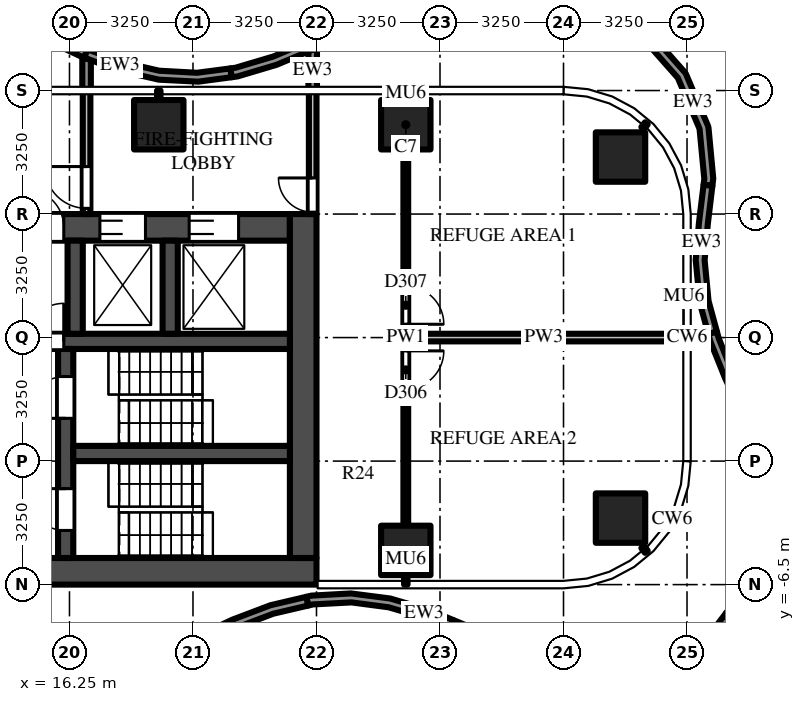
"""IFC4 building model, lengths in metres.
Left out: names, types, materials, properties, quantities, classifications, styles, units other than length and angle.
Written with IfcOpenShell. Run it as: python <this file> out.ifc"""

import sys

from ifc_helpers import new_model, si_unit, direction, frame, frame_2d, origin, origin_2d, place, context, subcontext, project, spatial, polyline, rectangle, outline, extrude, source, transform, mapped, element, fill, save


model = new_model("IFC4")
c1 = context("Model", 3, precision=1e-05, world=origin(), true_north=direction((0.0, 1.0)))
c2 = subcontext(c1, "Body", "Model", "MODEL_VIEW")
j1 = project(units=[si_unit("LENGTHUNIT", "METRE"), si_unit("PLANEANGLEUNIT", "RADIAN")], contexts=[c1])
p1 = place(None, origin())
s1 = spatial("IfcSite", under=j1, at=p1, CompositionType="ELEMENT")
p2 = place(p1, origin())
s2 = spatial("IfcBuilding", under=s1, at=p2, CompositionType="ELEMENT")
p3 = place(p2, frame((0.0, 0.0, 92.5)))
s3 = spatial("IfcBuildingStorey", under=s2, at=p3, CompositionType="ELEMENT", Elevation=92.5)
m1 = source(origin(), c2, "Body", "SweptSolid", [
    extrude(rectangle(XDim=1.3, YDim=1.3, at=origin_2d()), origin(), (0.0, 0.0, 1.0), 5.0),
])
for number, where, z_axis, x_axis in (
    (1, (18.6, 5.6, 0.0), (0.0, 0.0, 1.0), (1.0, 0.0, 0.0)),
    (2, (25.1, 5.6, 0.0), (0.0, 0.0, 1.0), (1.0, 0.0, 0.0)),
    (3, (30.75, 4.75, 0.0), (0.0, 0.0, 1.0), (1.0, 0.0, 0.0)),
    (4, (25.1, -5.6, 0.0), (0.0, 0.0, 1.0), (1.0, 0.0, 0.0)),
    (5, (30.75, -4.75, 0.0), (0.0, 0.0, 1.0), (1.0, 0.0, 0.0)),
):
    element("IfcColumn", number, at=place(p3, frame(where, z_axis=z_axis, x_axis=x_axis)), inside=s3, PredefinedType="COLUMN", context=c2, shape_type="MappedRepresentation", body=[
        mapped(m1, transform((0.0, 0.0, 0.0))),
    ])
m2 = source(origin(), c2, "Body", "SweptSolid", [
    extrude(rectangle(XDim=16.5, YDim=0.7, at=frame_2d((8.25, 0.0))), origin(), (0.0, 0.0, 1.0), 4.75),
])
p4 = place(p3, frame((6.25, -6.15, 0.0), z_axis=(0.0, 0.0, 1.0), x_axis=(1.0, 0.0, 0.0)))
e6 = element("IfcWall", 6, at=p4, inside=s3, PredefinedType="SHEAR", context=c2, shape_type="MappedRepresentation", body=[
    mapped(m2, transform((0.0, 0.0, 0.0))),
])
m3 = source(origin(), c2, "Body", "SweptSolid", [
    extrude(rectangle(XDim=14.85, YDim=0.7, at=frame_2d((7.425, 0.0))), origin(), (0.0, 0.0, 1.0), 4.75),
])
p5 = place(p3, frame((7.2, 2.9, 0.0), z_axis=(0.0, 0.0, 1.0), x_axis=(1.0, 0.0, 0.0)))
e7 = element("IfcWall", 7, at=p5, inside=s3, PredefinedType="SHEAR", context=c2, shape_type="MappedRepresentation", body=[
    mapped(m3, transform((0.0, 0.0, 0.0))),
])
m4 = source(origin(), c2, "Body", "SweptSolid", [
    extrude(rectangle(XDim=1.3, YDim=2.1, at=frame_2d((0.65, 1.05))), frame((0.0, 0.36, 0.0), z_axis=(0.0, -1.0, 0.0), x_axis=(1.0, 0.0, 0.0)), (0.0, 0.0, 1.0), 0.72),
])
p6 = place(p5, frame((12.2, 0.0, 0.0)))
e8 = element("IfcOpeningElement", 8, at=p6, cuts=e7, PredefinedType="OPENING", context=c2, shape_type="MappedRepresentation", body=[
    mapped(m4, transform((0.0, 0.0, 0.0))),
])
m5 = source(origin(), c2, "Body", "SweptSolid", [
    extrude(rectangle(XDim=1.2, YDim=2.1, at=frame_2d((0.6, 1.05))), frame((0.0, 0.36, 0.0), z_axis=(0.0, -1.0, 0.0), x_axis=(1.0, 0.0, 0.0)), (0.0, 0.0, 1.0), 0.72),
])
p7 = place(p5, frame((9.85, 0.0, 0.0)))
e9 = element("IfcOpeningElement", 9, at=p7, cuts=e7, PredefinedType="OPENING", context=c2, shape_type="MappedRepresentation", body=[
    mapped(m5, transform((0.0, 0.0, 0.0))),
])
m6 = source(origin(), c2, "Body", "SweptSolid", [
    extrude(rectangle(XDim=1.0, YDim=2.1, at=frame_2d((0.5, 1.05))), frame((0.0, 0.36, 0.0), z_axis=(0.0, -1.0, 0.0), x_axis=(1.0, 0.0, 0.0)), (0.0, 0.0, 1.0), 0.72),
])
p8 = place(p5, frame((7.9, 0.0, 0.0)))
e10 = element("IfcOpeningElement", 10, at=p8, cuts=e7, PredefinedType="OPENING", context=c2, shape_type="MappedRepresentation", body=[
    mapped(m6, transform((0.0, 0.0, 0.0))),
])
m7 = source(origin(), c2, "Body", "SweptSolid", [
    extrude(rectangle(XDim=0.8, YDim=2.1, at=frame_2d((0.4, 1.05))), frame((0.0, 0.36, 0.0), z_axis=(0.0, -1.0, 0.0), x_axis=(1.0, 0.0, 0.0)), (0.0, 0.0, 1.0), 0.72),
])
p9 = place(p5, frame((0.113, 0.0, 0.0)))
e11 = element("IfcOpeningElement", 11, at=p9, cuts=e7, PredefinedType="OPENING", context=c2, shape_type="MappedRepresentation", body=[
    mapped(m7, transform((0.0, 0.0, 0.0))),
])
p10 = place(p5, frame((1.288, 0.0, 0.0)))
e12 = element("IfcOpeningElement", 12, at=p10, cuts=e7, PredefinedType="OPENING", context=c2, shape_type="MappedRepresentation", body=[
    mapped(m7, transform((0.0, 0.0, 0.0))),
])
p11 = place(p5, frame((2.712, 0.0, 0.0)))
e13 = element("IfcOpeningElement", 13, at=p11, cuts=e7, PredefinedType="OPENING", context=c2, shape_type="MappedRepresentation", body=[
    mapped(m7, transform((0.0, 0.0, 0.0))),
])
p12 = place(p5, frame((3.887, 0.0, 0.0)))
e14 = element("IfcOpeningElement", 14, at=p12, cuts=e7, PredefinedType="OPENING", context=c2, shape_type="MappedRepresentation", body=[
    mapped(m7, transform((0.0, 0.0, 0.0))),
])
p13 = place(p5, frame((5.312, 0.0, 0.0)))
e15 = element("IfcOpeningElement", 15, at=p13, cuts=e7, PredefinedType="OPENING", context=c2, shape_type="MappedRepresentation", body=[
    mapped(m7, transform((0.0, 0.0, 0.0))),
])
p14 = place(p5, frame((6.488, 0.0, 0.0)))
e16 = element("IfcOpeningElement", 16, at=p14, cuts=e7, PredefinedType="OPENING", context=c2, shape_type="MappedRepresentation", body=[
    mapped(m7, transform((0.0, 0.0, 0.0))),
])
m8 = source(origin(), c2, "Body", "SweptSolid", [
    extrude(rectangle(XDim=9.05, YDim=0.7, at=frame_2d((4.525, 0.0))), origin(), (0.0, 0.0, 1.0), 4.75),
])
p15 = place(p3, frame((22.4, -5.8, 0.0), z_axis=(0.0, 0.0, 1.0), x_axis=(0.0, 1.0, 0.0)))
e17 = element("IfcWall", 17, at=p15, inside=s3, PredefinedType="SHEAR", context=c2, shape_type="MappedRepresentation", body=[
    mapped(m8, transform((0.0, 0.0, 0.0))),
])
m9 = source(origin(), c2, "Body", "SweptSolid", [
    extrude(rectangle(XDim=14.85, YDim=0.4, at=frame_2d((7.425, 0.0))), origin(), (0.0, 0.0, 1.0), 4.75),
])
p16 = place(p3, frame((7.2, -0.1, 0.0), z_axis=(0.0, 0.0, 1.0), x_axis=(1.0, 0.0, 0.0)))
e18 = element("IfcWall", 18, at=p16, inside=s3, PredefinedType="SHEAR", context=c2, shape_type="MappedRepresentation", body=[
    mapped(m9, transform((0.0, 0.0, 0.0))),
])
m10 = source(origin(), c2, "Body", "SweptSolid", [
    extrude(rectangle(XDim=1.0, YDim=2.1, at=frame_2d((0.5, 1.05))), frame((0.0, 0.21, 0.0), z_axis=(0.0, -1.0, 0.0), x_axis=(1.0, 0.0, 0.0)), (0.0, 0.0, 1.0), 0.42),
])
p17 = place(p16, frame((7.9, 0.0, 0.0)))
e19 = element("IfcOpeningElement", 19, at=p17, cuts=e18, PredefinedType="OPENING", context=c2, shape_type="MappedRepresentation", body=[
    mapped(m10, transform((0.0, 0.0, 0.0))),
])
m11 = source(origin(), c2, "Body", "SweptSolid", [
    extrude(rectangle(XDim=5.5, YDim=0.4, at=frame_2d((2.75, 0.0))), origin(), (0.0, 0.0, 1.0), 4.75),
])
p18 = place(p3, frame((16.15, -5.8, 0.0), z_axis=(0.0, 0.0, 1.0), x_axis=(0.0, 1.0, 0.0)))
e20 = element("IfcWall", 20, at=p18, inside=s3, PredefinedType="SHEAR", context=c2, shape_type="MappedRepresentation", body=[
    mapped(m11, transform((0.0, 0.0, 0.0))),
])
m12 = source(origin(), c2, "Body", "SweptSolid", [
    extrude(rectangle(XDim=1.1, YDim=2.1, at=frame_2d((0.55, 1.05))), frame((0.0, 0.21, 0.0), z_axis=(0.0, -1.0, 0.0), x_axis=(1.0, 0.0, 0.0)), (0.0, 0.0, 1.0), 0.42),
])
p19 = place(p18, frame((0.725, 0.0, 0.0)))
e21 = element("IfcOpeningElement", 21, at=p19, cuts=e20, PredefinedType="OPENING", context=c2, shape_type="MappedRepresentation", body=[
    mapped(m12, transform((0.0, 0.0, 0.0))),
])
p20 = place(p18, frame((3.675, 0.0, 0.0)))
e22 = element("IfcOpeningElement", 22, at=p20, cuts=e20, PredefinedType="OPENING", context=c2, shape_type="MappedRepresentation", body=[
    mapped(m12, transform((0.0, 0.0, 0.0))),
])
m13 = source(origin(), c2, "Body", "SweptSolid", [
    extrude(rectangle(XDim=5.7, YDim=0.4, at=frame_2d((2.85, 0.0))), origin(), (0.0, 0.0, 1.0), 4.75),
])
p21 = place(p3, frame((16.35, -3.05, 0.0), z_axis=(0.0, 0.0, 1.0), x_axis=(1.0, 0.0, 0.0)))
e23 = element("IfcWall", 23, at=p21, inside=s3, PredefinedType="SHEAR", context=c2, shape_type="MappedRepresentation", body=[
    mapped(m13, transform((0.0, 0.0, 0.0))),
])
m14 = source(origin(), c2, "Body", "SweptSolid", [
    extrude(rectangle(XDim=2.45, YDim=0.4, at=frame_2d((1.225, 0.0))), origin(), (0.0, 0.0, 1.0), 4.75),
])
for number, where, z_axis, x_axis in (
    (24, (16.4, 0.1, 0.0), (0.0, 0.0, 1.0), (0.0, 1.0, 0.0)),
    (25, (18.9, 0.1, 0.0), (0.0, 0.0, 1.0), (0.0, 1.0, 0.0)),
):
    element("IfcWall", number, at=place(p3, frame(where, z_axis=z_axis, x_axis=x_axis)), inside=s3, PredefinedType="SHEAR", context=c2, shape_type="MappedRepresentation", body=[
        mapped(m14, transform((0.0, 0.0, 0.0))),
    ])
m15 = source(origin(), c2, "Body", "SweptSolid", [
    extrude(rectangle(XDim=3.25, YDim=0.2, at=frame_2d((1.625, 0.0))), origin(), (0.0, 0.0, 1.0), 4.75),
])
p22 = place(p3, frame((16.7, 3.25, 0.0), z_axis=(0.0, 0.0, 1.0), x_axis=(0.0, 1.0, 0.0)))
e26 = element("IfcWall", 26, at=p22, inside=s3, PredefinedType="PARTITIONING", context=c2, shape_type="MappedRepresentation", body=[
    mapped(m15, transform((0.0, 0.0, 0.0))),
])
m16 = source(origin(), c2, "Body", "SweptSolid", [
    extrude(rectangle(XDim=1.1, YDim=2.1, at=frame_2d((0.55, 1.05))), frame((0.0, 0.11, 0.0), z_axis=(0.0, -1.0, 0.0), x_axis=(1.0, 0.0, 0.0)), (0.0, 0.0, 1.0), 0.22),
])
p23 = place(p22, frame((0.15, 0.0, 0.0)))
e27 = element("IfcOpeningElement", 27, at=p23, cuts=e26, PredefinedType="OPENING", context=c2, shape_type="MappedRepresentation", body=[
    mapped(m16, transform((0.0, 0.0, 0.0))),
])
p24 = place(p3, frame((22.65, 3.25, 0.0), z_axis=(0.0, 0.0, 1.0), x_axis=(0.0, 1.0, 0.0)))
e28 = element("IfcWall", 28, at=p24, inside=s3, PredefinedType="PARTITIONING", context=c2, shape_type="MappedRepresentation", body=[
    mapped(m15, transform((0.0, 0.0, 0.0))),
])
m17 = source(origin(), c2, "Body", "SweptSolid", [
    extrude(rectangle(XDim=0.9, YDim=2.1, at=frame_2d((0.45, 1.05))), frame((0.0, 0.11, 0.0), z_axis=(0.0, -1.0, 0.0), x_axis=(1.0, 0.0, 0.0)), (0.0, 0.0, 1.0), 0.22),
])
p25 = place(p24, frame((0.05, 0.0, 0.0)))
e29 = element("IfcOpeningElement", 29, at=p25, cuts=e28, PredefinedType="OPENING", context=c2, shape_type="MappedRepresentation", body=[
    mapped(m17, transform((0.0, 0.0, 0.0))),
])
p26 = place(p3, frame((22.65, 6.5, 0.0), z_axis=(0.0, 0.0, 1.0), x_axis=(0.0, 1.0, 0.0)))
e30 = element("IfcWall", 30, at=p26, inside=s3, PredefinedType="PARAPET", context=c2, shape_type="SweptSolid", body=[
    extrude(rectangle(XDim=1.076, YDim=0.225, at=frame_2d((0.538, 0.0))), origin(), (0.0, 0.0, 1.0), 1.1),
])
p27 = place(p3, frame((16.7, 6.5, 0.0), z_axis=(0.0, 0.0, 1.0), x_axis=(0.0, 1.0, 0.0)))
e31 = element("IfcWall", 31, at=p27, inside=s3, PredefinedType="PARAPET", context=c2, shape_type="SweptSolid", body=[
    extrude(rectangle(XDim=0.842, YDim=0.225, at=frame_2d((0.421, 0.0))), origin(), (0.0, 0.0, 1.0), 1.1),
])
p28 = place(p3, origin())
e32 = element("IfcWall", 32, at=p28, inside=s3, PredefinedType="PARAPET", context=c2, shape_type="SweptSolid", body=[
    extrude(outline(polyline([(13.069, 9.166), (13.649, 8.982), (14.668, 8.544), (16.642, 7.615), (16.722, 7.585), (16.64, 7.365), (16.546, 7.4), (14.57, 8.33), (13.573, 8.759), (12.998, 8.942), (13.069, 9.166)])), origin(), (0.0, 0.0, 1.0), 1.1),
])
e33 = element("IfcWall", 33, at=p28, inside=s3, PredefinedType="PARAPET", context=c2, shape_type="SweptSolid", body=[
    extrude(outline(polyline([(16.722, 7.585), (17.626, 7.249), (18.612, 7.022), (19.605, 6.967), (20.486, 7.083), (20.517, 6.851), (19.637, 6.733), (18.602, 6.786), (17.552, 7.026), (16.64, 7.365), (16.722, 7.585)])), origin(), (0.0, 0.0, 1.0), 1.1),
])
e34 = element("IfcWall", 34, at=p28, inside=s3, PredefinedType="PARAPET", context=c2, shape_type="SweptSolid", body=[
    extrude(outline(polyline([(20.486, 7.083), (20.617, 7.1), (21.613, 7.396), (22.64, 7.826), (24.102, 8.516), (24.202, 8.304), (22.738, 7.613), (21.705, 7.179), (20.675, 6.872), (20.517, 6.851), (20.486, 7.083)])), origin(), (0.0, 0.0, 1.0), 1.1),
])
e35 = element("IfcWall", 35, at=p28, inside=s3, PredefinedType="PARAPET", context=c2, shape_type="SweptSolid", body=[
    extrude(outline(polyline([(31.748, 7.767), (32.447, 6.974), (32.474, 6.932), (33.053, 5.568), (33.065, 5.522), (33.19, 4.186), (33.167, 3.992), (32.936, 4.021), (32.955, 4.177), (32.83, 5.493), (32.259, 6.833), (31.571, 7.61), (31.748, 7.767)])), origin(), (0.0, 0.0, 1.0), 1.1),
])
e36 = element("IfcWall", 36, at=p28, inside=s3, PredefinedType="PARAPET", context=c2, shape_type="SweptSolid", body=[
    extrude(outline(polyline([(33.167, 3.992), (33.049, 3.003), (32.963, 2.033), (33.067, 0.965), (33.287, 0.155), (33.061, 0.093), (32.837, 0.913), (32.729, 2.043), (32.815, 3.029), (32.936, 4.021), (33.167, 3.992)])), origin(), (0.0, 0.0, 1.0), 1.1),
])
e37 = element("IfcWall", 37, at=p28, inside=s3, PredefinedType="PARAPET", context=c2, shape_type="SweptSolid", body=[
    extrude(outline(polyline([(33.287, 0.155), (33.335, -0.02), (33.72, -0.981), (34.651, -2.967), (34.663, -3.007), (34.753, -3.545), (34.521, -3.584), (34.431, -3.052), (33.503, -1.072), (33.114, -0.101), (33.061, 0.093), (33.287, 0.155)])), origin(), (0.0, 0.0, 1.0), 1.1),
])
e38 = element("IfcWall", 38, at=p28, inside=s3, PredefinedType="PARAPET", context=c2, shape_type="SweptSolid", body=[
    extrude(outline(polyline([(33.713, -7.389), (33.325, -7.9), (33.269, -7.945), (31.684, -8.843), (31.616, -8.862), (30.069, -9.046), (30.042, -8.808), (31.576, -8.63), (31.606, -8.62), (33.161, -7.731), (33.528, -7.248), (33.713, -7.389)])), origin(), (0.0, 0.0, 1.0), 1.1),
])
e39 = element("IfcWall", 39, at=p28, inside=s3, PredefinedType="PARAPET", context=c2, shape_type="SweptSolid", body=[
    extrude(outline(polyline([(30.069, -9.046), (29.998, -9.055), (29.908, -9.049), (28.583, -8.727), (26.629, -7.802), (26.254, -7.647), (26.344, -7.43), (26.727, -7.588), (28.673, -8.509), (29.953, -8.818), (30.042, -8.808), (30.069, -9.046)])), origin(), (0.0, 0.0, 1.0), 1.1),
])
e40 = element("IfcWall", 40, at=p28, inside=s3, PredefinedType="PARAPET", context=c2, shape_type="SweptSolid", body=[
    extrude(outline(polyline([(26.254, -7.647), (25.601, -7.376), (24.648, -7.097), (23.67, -6.968), (22.66, -7.021), (22.534, -7.051), (22.48, -6.822), (22.617, -6.79), (23.656, -6.732), (24.688, -6.865), (25.673, -7.152), (26.344, -7.43), (26.254, -7.647)])), origin(), (0.0, 0.0, 1.0), 1.1),
])
e41 = element("IfcWall", 41, at=p28, inside=s3, PredefinedType="PARAPET", context=c2, shape_type="SweptSolid", body=[
    extrude(outline(polyline([(22.534, -7.051), (21.615, -7.265), (20.631, -7.637), (18.886, -8.46), (18.786, -8.248), (20.535, -7.423), (21.539, -7.042), (22.48, -6.822), (22.534, -7.051)])), origin(), (0.0, 0.0, 1.0), 1.1),
])
m18 = source(origin(), c2, "Body", "SweptSolid", [
    extrude(rectangle(XDim=9.9, YDim=0.125, at=frame_2d((4.95, 0.0))), origin(), (0.0, 0.0, 1.0), 3.968),
])
p29 = place(p3, frame((25.1, 4.95, 0.0), z_axis=(0.0, 0.0, 1.0), x_axis=(0.0, -1.0, 0.0)))
e42 = element("IfcWall", 42, at=p29, inside=s3, PredefinedType="PARTITIONING", context=c2, shape_type="MappedRepresentation", body=[
    mapped(m18, transform((0.0, 0.0, 0.0))),
])
m19 = source(origin(), c2, "Body", "SweptSolid", [
    extrude(rectangle(XDim=1.0, YDim=2.1, at=frame_2d((0.5, 1.05))), frame((0.0, 0.073, 0.0), z_axis=(0.0, -1.0, 0.0), x_axis=(1.0, 0.0, 0.0)), (0.0, 0.0, 1.0), 0.145),
])
p30 = place(p29, frame((5.3, 0.0, 0.0)))
e43 = element("IfcOpeningElement", 43, at=p30, cuts=e42, PredefinedType="OPENING", context=c2, shape_type="MappedRepresentation", body=[
    mapped(m19, transform((0.0, 0.0, 0.0))),
])
p31 = place(p29, frame((3.6, 0.0, 0.0)))
e44 = element("IfcOpeningElement", 44, at=p31, cuts=e42, PredefinedType="OPENING", context=c2, shape_type="MappedRepresentation", body=[
    mapped(m19, transform((0.0, 0.0, 0.0))),
])
p32 = place(p3, frame((25.163, 0.0, 0.0), z_axis=(0.0, 0.0, 1.0), x_axis=(1.0, 0.0, 0.0)))
e45 = element("IfcWall", 45, at=p32, inside=s3, PredefinedType="PARTITIONING", context=c2, shape_type="SweptSolid", body=[
    extrude(rectangle(XDim=7.137, YDim=0.2, at=frame_2d((3.569, 0.0))), origin(), (0.0, 0.0, 1.0), 3.968),
])
m20 = source(origin(), c2, "Body", "SweptSolid", [
    extrude(rectangle(XDim=1.3, YDim=2.1, at=frame_2d((0.65, 1.05))), frame((0.0, -0.275, 0.0), z_axis=(0.0, -1.0, 0.0), x_axis=(1.0, 0.0, 0.0)), (0.0, 0.0, 1.0), 0.05),
])
p33 = place(p6, origin())
e46 = element("IfcDoor", 46, at=p33, inside=s3, OperationType="DOUBLE_DOOR_SLIDING", PredefinedType="DOOR", context=c2, shape_type="MappedRepresentation", body=[
    mapped(m20, transform((0.0, 0.0, 0.0))),
])
fill(e8, e46)
m21 = source(origin(), c2, "Body", "SweptSolid", [
    extrude(rectangle(XDim=1.2, YDim=2.1, at=frame_2d((0.6, 1.05))), frame((0.0, -0.275, 0.0), z_axis=(0.0, -1.0, 0.0), x_axis=(1.0, 0.0, 0.0)), (0.0, 0.0, 1.0), 0.05),
])
p34 = place(p7, origin())
e47 = element("IfcDoor", 47, at=p34, inside=s3, OperationType="DOUBLE_DOOR_SLIDING", PredefinedType="DOOR", context=c2, shape_type="MappedRepresentation", body=[
    mapped(m21, transform((0.0, 0.0, 0.0))),
])
fill(e9, e47)
m22 = source(origin(), c2, "Body", "SweptSolid", [
    extrude(rectangle(XDim=1.1, YDim=2.1, at=frame_2d((0.55, 1.05))), frame((0.0, 0.025, 0.0), z_axis=(0.0, -1.0, 0.0), x_axis=(1.0, 0.0, 0.0)), (0.0, 0.0, 1.0), 0.05),
])
p35 = place(p19, origin())
e48 = element("IfcDoor", 48, at=p35, inside=s3, OperationType="SINGLE_SWING_RIGHT", PredefinedType="DOOR", context=c2, shape_type="MappedRepresentation", body=[
    mapped(m22, transform((0.0, 0.0, 0.0))),
])
fill(e21, e48)
p36 = place(p20, origin())
e49 = element("IfcDoor", 49, at=p36, inside=s3, OperationType="SINGLE_SWING_LEFT", PredefinedType="DOOR", context=c2, shape_type="MappedRepresentation", body=[
    mapped(m22, transform((0.0, 0.0, 0.0))),
])
fill(e22, e49)
m23 = source(origin(), c2, "Body", "SweptSolid", [
    extrude(rectangle(XDim=1.0, YDim=2.1, at=frame_2d((0.5, 1.05))), frame((0.0, 0.025, 0.0), z_axis=(0.0, -1.0, 0.0), x_axis=(1.0, 0.0, 0.0)), (0.0, 0.0, 1.0), 0.05),
])
p37 = place(p17, origin())
e50 = element("IfcDoor", 50, at=p37, inside=s3, OperationType="SINGLE_SWING_RIGHT", PredefinedType="DOOR", context=c2, shape_type="MappedRepresentation", body=[
    mapped(m23, transform((0.0, 0.0, 0.0))),
])
fill(e19, e50)
m24 = source(origin(), c2, "Body", "SweptSolid", [
    extrude(rectangle(XDim=1.0, YDim=2.1, at=frame_2d((0.5, 1.05))), frame((0.0, -0.275, 0.0), z_axis=(0.0, -1.0, 0.0), x_axis=(1.0, 0.0, 0.0)), (0.0, 0.0, 1.0), 0.05),
])
p38 = place(p8, origin())
e51 = element("IfcDoor", 51, at=p38, inside=s3, OperationType="SINGLE_SWING_LEFT", PredefinedType="DOOR", context=c2, shape_type="MappedRepresentation", body=[
    mapped(m24, transform((0.0, 0.0, 0.0))),
])
fill(e10, e51)
p39 = place(p23, origin())
e52 = element("IfcDoor", 52, at=p39, inside=s3, OperationType="SINGLE_SWING_RIGHT", PredefinedType="DOOR", context=c2, shape_type="MappedRepresentation", body=[
    mapped(m22, transform((0.0, 0.0, 0.0))),
])
fill(e27, e52)
m25 = source(origin(), c2, "Body", "SweptSolid", [
    extrude(rectangle(XDim=0.9, YDim=2.1, at=frame_2d((0.45, 1.05))), frame((0.0, 0.025, 0.0), z_axis=(0.0, -1.0, 0.0), x_axis=(1.0, 0.0, 0.0)), (0.0, 0.0, 1.0), 0.05),
])
p40 = place(p25, origin())
e53 = element("IfcDoor", 53, at=p40, inside=s3, OperationType="SINGLE_SWING_RIGHT", PredefinedType="DOOR", context=c2, shape_type="MappedRepresentation", body=[
    mapped(m25, transform((0.0, 0.0, 0.0))),
])
fill(e29, e53)
p41 = place(p30, origin())
e54 = element("IfcDoor", 54, at=p41, inside=s3, OperationType="SINGLE_SWING_LEFT", PredefinedType="DOOR", context=c2, shape_type="MappedRepresentation", body=[
    mapped(m23, transform((0.0, 0.0, 0.0))),
])
fill(e43, e54)
p42 = place(p31, origin())
e55 = element("IfcDoor", 55, at=p42, inside=s3, OperationType="SINGLE_SWING_RIGHT", PredefinedType="DOOR", context=c2, shape_type="MappedRepresentation", body=[
    mapped(m23, transform((0.0, 0.0, 0.0))),
])
fill(e44, e55)
save(model, sys.argv[1])
